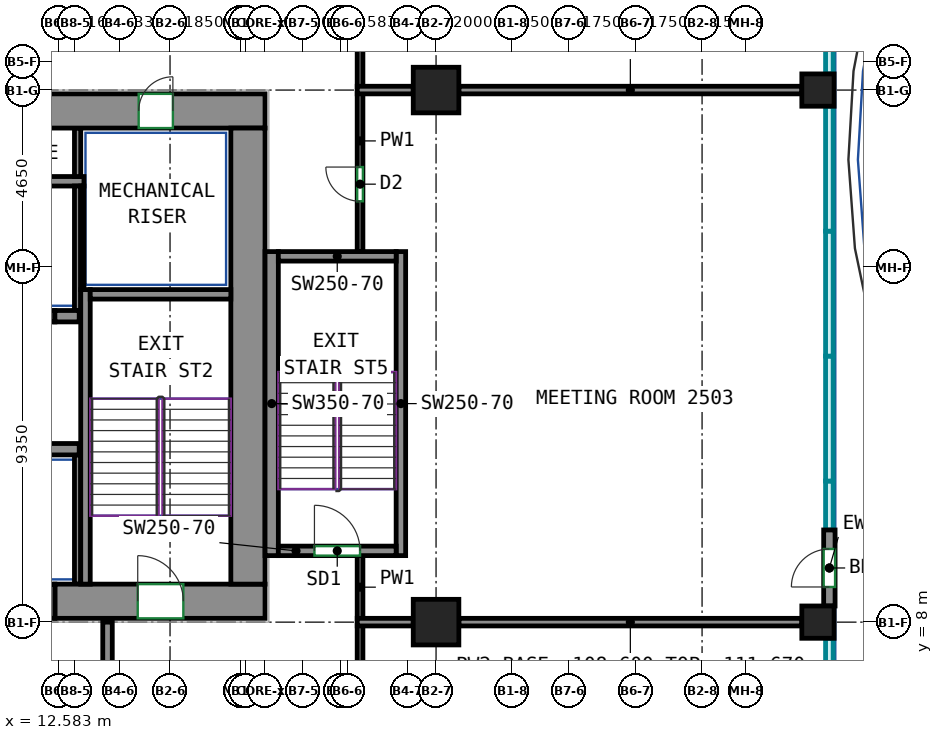
"""IFC4 building model, lengths in metres.
Left out: names, types, materials, properties, quantities, classifications, styles, units other than length and angle.
Written with IfcOpenShell. Run it as: python <this file> out.ifc"""

import sys

from ifc_helpers import new_model, si_unit, direction, frame, frame_2d, origin, origin_2d, place, context, subcontext, project, spatial, rectangle, extrude, source, transform, mapped, element, fill, save


model = new_model("IFC4")
c1 = context("Model", 3, precision=1e-05, world=origin(), true_north=direction((0.0, 1.0)))
c2 = subcontext(c1, "Body", "Model", "MODEL_VIEW")
j1 = project(units=[si_unit("LENGTHUNIT", "METRE"), si_unit("PLANEANGLEUNIT", "RADIAN")], contexts=[c1])
p1 = place(None, origin())
s1 = spatial("IfcSite", under=j1, at=p1, CompositionType="ELEMENT")
p2 = place(p1, origin())
s2 = spatial("IfcBuilding", under=s1, at=p2, CompositionType="ELEMENT")
p3 = place(p2, frame((0.0, 0.0, 108.6)))
s3 = spatial("IfcBuildingStorey", under=s2, at=p3, CompositionType="ELEMENT", Elevation=108.6)
m1 = source(origin(), c2, "Body", "SweptSolid", [
    extrude(rectangle(XDim=1.2, YDim=1.2, at=origin_2d()), origin(), (0.0, 0.0, 1.0), 3.72),
])
for number, where, z_axis, x_axis in (
    (1, (22.5, 8.0, 0.0), (0.0, 0.0, 1.0), (1.0, 0.0, 0.0)),
    (2, (22.5, 22.0, 0.0), (0.0, 0.0, 1.0), (1.0, 0.0, 0.0)),
):
    element("IfcColumn", number, at=place(p3, frame(where, z_axis=z_axis, x_axis=x_axis)), inside=s3, PredefinedType="COLUMN", context=c2, shape_type="MappedRepresentation", body=[
        mapped(m1, transform((0.0, 0.0, 0.0))),
    ])
m2 = source(origin(), c2, "Body", "SweptSolid", [
    extrude(rectangle(XDim=0.85, YDim=0.85, at=origin_2d()), origin(), (0.0, 0.0, 1.0), 3.72),
])
for number, where, z_axis, x_axis in (
    (3, (32.55, 8.0, 0.0), (0.0, 0.0, 1.0), (1.0, 0.0, 0.0)),
    (4, (32.55, 22.0, 0.0), (0.0, 0.0, 1.0), (1.0, 0.0, 0.0)),
):
    element("IfcColumn", number, at=place(p3, frame(where, z_axis=z_axis, x_axis=x_axis)), inside=s3, PredefinedType="COLUMN", context=c2, shape_type="MappedRepresentation", body=[
        mapped(m2, transform((0.0, 0.0, 0.0))),
    ])
m3 = source(origin(), c2, "Body", "SweptSolid", [
    extrude(rectangle(XDim=5.53, YDim=0.9, at=frame_2d((2.765, 0.0))), origin(), (0.0, 0.0, 1.0), 3.72),
])
p4 = place(p3, frame((12.47, 8.55, 0.0), z_axis=(0.0, 0.0, 1.0), x_axis=(1.0, 0.0, 0.0)))
e5 = element("IfcWall", 5, at=p4, inside=s3, PredefinedType="SHEAR", context=c2, shape_type="MappedRepresentation", body=[
    mapped(m3, transform((0.0, 0.0, 0.0))),
])
p5 = place(p4, frame((2.18, 0.0, 0.0)))
e6 = element("IfcOpeningElement", 6, at=p5, cuts=e5, PredefinedType="OPENING", context=c2, shape_type="SweptSolid", body=[
    extrude(rectangle(XDim=1.2, YDim=2.1, at=frame_2d((0.6, 1.05))), frame((0.0, 0.46, 0.0), z_axis=(0.0, -1.0, 0.0), x_axis=(1.0, 0.0, 0.0)), (0.0, 0.0, 1.0), 0.92),
])
m4 = source(origin(), c2, "Body", "SweptSolid", [
    extrude(rectangle(XDim=33.9, YDim=0.9, at=frame_2d((16.95, 0.0))), origin(), (0.0, 0.0, 1.0), 3.72),
])
p6 = place(p3, frame((-15.9, 21.45, 0.0), z_axis=(0.0, 0.0, 1.0), x_axis=(1.0, 0.0, 0.0)))
e7 = element("IfcWall", 7, at=p6, inside=s3, PredefinedType="SHEAR", context=c2, shape_type="MappedRepresentation", body=[
    mapped(m4, transform((0.0, 0.0, 0.0))),
])
p7 = place(p6, frame((7.12, 0.0, 0.0)))
e8 = element("IfcOpeningElement", 8, at=p7, cuts=e7, PredefinedType="OPENING", context=c2, shape_type="SweptSolid", body=[
    extrude(rectangle(XDim=0.9, YDim=2.1, at=frame_2d((0.45, 1.05))), frame((0.0, 0.46, 0.0), z_axis=(0.0, -1.0, 0.0), x_axis=(1.0, 0.0, 0.0)), (0.0, 0.0, 1.0), 0.92),
])
p8 = place(p6, frame((12.427, 0.0, 0.0)))
e9 = element("IfcOpeningElement", 9, at=p8, cuts=e7, PredefinedType="OPENING", context=c2, shape_type="SweptSolid", body=[
    extrude(rectangle(XDim=0.9, YDim=2.1, at=frame_2d((0.45, 1.05))), frame((0.0, 0.46, 0.0), z_axis=(0.0, -1.0, 0.0), x_axis=(1.0, 0.0, 0.0)), (0.0, 0.0, 1.0), 0.92),
])
p9 = place(p6, frame((17.465, 0.0, 0.0)))
e10 = element("IfcOpeningElement", 10, at=p9, cuts=e7, PredefinedType="OPENING", context=c2, shape_type="SweptSolid", body=[
    extrude(rectangle(XDim=0.9, YDim=2.1, at=frame_2d((0.45, 1.05))), frame((0.0, 0.46, 0.0), z_axis=(0.0, -1.0, 0.0), x_axis=(1.0, 0.0, 0.0)), (0.0, 0.0, 1.0), 0.92),
])
p10 = place(p6, frame((21.686, 0.0, 0.0)))
e11 = element("IfcOpeningElement", 11, at=p10, cuts=e7, PredefinedType="OPENING", context=c2, shape_type="SweptSolid", body=[
    extrude(rectangle(XDim=0.9, YDim=2.1, at=frame_2d((0.45, 1.05))), frame((0.0, 0.46, 0.0), z_axis=(0.0, -1.0, 0.0), x_axis=(1.0, 0.0, 0.0)), (0.0, 0.0, 1.0), 0.92),
])
p11 = place(p6, frame((26.027, 0.0, 0.0)))
e12 = element("IfcOpeningElement", 12, at=p11, cuts=e7, PredefinedType="OPENING", context=c2, shape_type="SweptSolid", body=[
    extrude(rectangle(XDim=0.9, YDim=2.1, at=frame_2d((0.45, 1.05))), frame((0.0, 0.46, 0.0), z_axis=(0.0, -1.0, 0.0), x_axis=(1.0, 0.0, 0.0)), (0.0, 0.0, 1.0), 0.92),
])
p12 = place(p6, frame((2.425, 0.0, 0.0)))
e13 = element("IfcOpeningElement", 13, at=p12, cuts=e7, PredefinedType="OPENING", context=c2, shape_type="SweptSolid", body=[
    extrude(rectangle(XDim=0.9, YDim=2.1, at=frame_2d((0.45, 1.05))), frame((0.0, 0.46, 0.0), z_axis=(0.0, -1.0, 0.0), x_axis=(1.0, 0.0, 0.0)), (0.0, 0.0, 1.0), 0.92),
])
p13 = place(p6, frame((30.575, 0.0, 0.0)))
e14 = element("IfcOpeningElement", 14, at=p13, cuts=e7, PredefinedType="OPENING", context=c2, shape_type="SweptSolid", body=[
    extrude(rectangle(XDim=0.9, YDim=2.1, at=frame_2d((0.45, 1.05))), frame((0.0, 0.46, 0.0), z_axis=(0.0, -1.0, 0.0), x_axis=(1.0, 0.0, 0.0)), (0.0, 0.0, 1.0), 0.92),
])
m5 = source(origin(), c2, "Body", "SweptSolid", [
    extrude(rectangle(XDim=12.0, YDim=0.9, at=frame_2d((6.0, 0.0))), origin(), (0.0, 0.0, 1.0), 3.72),
])
p14 = place(p3, frame((17.55, 9.0, 0.0), z_axis=(0.0, 0.0, 1.0), x_axis=(0.0, 1.0, 0.0)))
e15 = element("IfcWall", 15, at=p14, inside=s3, PredefinedType="SHEAR", context=c2, shape_type="MappedRepresentation", body=[
    mapped(m5, transform((0.0, 0.0, 0.0))),
])
m6 = source(origin(), c2, "Body", "SweptSolid", [
    extrude(rectangle(XDim=7.75, YDim=0.25, at=frame_2d((3.875, 0.0))), origin(), (0.0, 0.0, 1.0), 3.72),
])
p15 = place(p3, frame((13.275, 9.0, 0.0), z_axis=(0.0, 0.0, 1.0), x_axis=(0.0, 1.0, 0.0)))
e16 = element("IfcWall", 16, at=p15, inside=s3, PredefinedType="SHEAR", context=c2, shape_type="MappedRepresentation", body=[
    mapped(m6, transform((0.0, 0.0, 0.0))),
])
m7 = source(origin(), c2, "Body", "SweptSolid", [
    extrude(rectangle(XDim=3.7, YDim=0.25, at=frame_2d((1.85, 0.0))), origin(), (0.0, 0.0, 1.0), 3.72),
])
p16 = place(p3, frame((13.4, 16.625, 0.0), z_axis=(0.0, 0.0, 1.0), x_axis=(1.0, 0.0, 0.0)))
e17 = element("IfcWall", 17, at=p16, inside=s3, PredefinedType="SHEAR", context=c2, shape_type="MappedRepresentation", body=[
    mapped(m7, transform((0.0, 0.0, 0.0))),
])
m8 = source(origin(), c2, "Body", "SweptSolid", [
    extrude(rectangle(XDim=8.0, YDim=0.35, at=frame_2d((4.0, 0.0))), origin(), (0.0, 0.0, 1.0), 3.72),
])
p17 = place(p3, frame((18.175, 9.75, 0.0), z_axis=(0.0, 0.0, 1.0), x_axis=(0.0, 1.0, 0.0)))
e18 = element("IfcWall", 18, at=p17, inside=s3, PredefinedType="SHEAR", context=c2, shape_type="MappedRepresentation", body=[
    mapped(m8, transform((0.0, 0.0, 0.0))),
])
m9 = source(origin(), c2, "Body", "SweptSolid", [
    extrude(rectangle(XDim=8.0, YDim=0.25, at=frame_2d((4.0, 0.0))), origin(), (0.0, 0.0, 1.0), 3.72),
])
p18 = place(p3, frame((21.575, 9.75, 0.0), z_axis=(0.0, 0.0, 1.0), x_axis=(0.0, 1.0, 0.0)))
e19 = element("IfcWall", 19, at=p18, inside=s3, PredefinedType="SHEAR", context=c2, shape_type="MappedRepresentation", body=[
    mapped(m9, transform((0.0, 0.0, 0.0))),
])
m10 = source(origin(), c2, "Body", "SweptSolid", [
    extrude(rectangle(XDim=3.1, YDim=0.25, at=frame_2d((1.55, 0.0))), origin(), (0.0, 0.0, 1.0), 3.72),
])
p19 = place(p3, frame((18.35, 9.875, 0.0), z_axis=(0.0, 0.0, 1.0), x_axis=(1.0, 0.0, 0.0)))
e20 = element("IfcWall", 20, at=p19, inside=s3, PredefinedType="SHEAR", context=c2, shape_type="MappedRepresentation", body=[
    mapped(m10, transform((0.0, 0.0, 0.0))),
])
p20 = place(p19, frame((0.95, 0.0, 0.0)))
e21 = element("IfcOpeningElement", 21, at=p20, cuts=e20, PredefinedType="OPENING", context=c2, shape_type="SweptSolid", body=[
    extrude(rectangle(XDim=1.2, YDim=2.1, at=frame_2d((0.6, 1.05))), frame((0.0, 0.135, 0.0), z_axis=(0.0, -1.0, 0.0), x_axis=(1.0, 0.0, 0.0)), (0.0, 0.0, 1.0), 0.27),
])
p21 = place(p3, frame((18.35, 17.625, 0.0), z_axis=(0.0, 0.0, 1.0), x_axis=(1.0, 0.0, 0.0)))
e22 = element("IfcWall", 22, at=p21, inside=s3, PredefinedType="SHEAR", context=c2, shape_type="MappedRepresentation", body=[
    mapped(m10, transform((0.0, 0.0, 0.0))),
])
m11 = source(origin(), c2, "Body", "SweptSolid", [
    extrude(rectangle(XDim=2.82, YDim=0.3, at=frame_2d((1.41, 0.0))), origin(), (0.0, 0.0, 1.0), 3.72),
])
p22 = place(p3, frame((10.29, 12.55, 0.0), z_axis=(0.0, 0.0, 1.0), x_axis=(1.0, 0.0, 0.0)))
e23 = element("IfcWall", 23, at=p22, inside=s3, PredefinedType="SHEAR", context=c2, shape_type="MappedRepresentation", body=[
    mapped(m11, transform((0.0, 0.0, 0.0))),
])
m12 = source(origin(), c2, "Body", "SweptSolid", [
    extrude(rectangle(XDim=0.64, YDim=0.3, at=frame_2d((0.32, 0.0))), origin(), (0.0, 0.0, 1.0), 3.72),
])
p23 = place(p3, frame((12.47, 16.05, 0.0), z_axis=(0.0, 0.0, 1.0), x_axis=(1.0, 0.0, 0.0)))
e24 = element("IfcWall", 24, at=p23, inside=s3, PredefinedType="SHEAR", context=c2, shape_type="MappedRepresentation", body=[
    mapped(m12, transform((0.0, 0.0, 0.0))),
])
m13 = source(origin(), c2, "Body", "SweptSolid", [
    extrude(rectangle(XDim=2.0, YDim=0.3, at=frame_2d((1.0, 0.0))), origin(), (0.0, 0.0, 1.0), 3.72),
])
p24 = place(p3, frame((32.85, 8.425, 0.0), z_axis=(0.0, 0.0, 1.0), x_axis=(0.0, 1.0, 0.0)))
e25 = element("IfcWall", 25, at=p24, inside=s3, PredefinedType="SOLIDWALL", context=c2, shape_type="MappedRepresentation", body=[
    mapped(m13, transform((0.0, 0.0, 0.0))),
])
p25 = place(p24, frame((0.5, 0.0, 0.0)))
e26 = element("IfcOpeningElement", 26, at=p25, cuts=e25, PredefinedType="OPENING", context=c2, shape_type="SweptSolid", body=[
    extrude(rectangle(XDim=1.0, YDim=2.1, at=frame_2d((0.5, 1.05))), frame((0.0, 0.16, 0.0), z_axis=(0.0, -1.0, 0.0), x_axis=(1.0, 0.0, 0.0)), (0.0, 0.0, 1.0), 0.32),
])
m14 = source(origin(), c2, "Body", "SweptSolid", [
    extrude(rectangle(XDim=1.4, YDim=0.3, at=frame_2d((0.7, 0.0))), origin(), (0.0, 0.0, 1.0), 3.72),
])
p26 = place(p3, frame((11.07, 16.05, 0.0), z_axis=(0.0, 0.0, 1.0), x_axis=(1.0, 0.0, 0.0)))
e27 = element("IfcWall", 27, at=p26, inside=s3, PredefinedType="PARTITIONING", context=c2, shape_type="MappedRepresentation", body=[
    mapped(m14, transform((0.0, 0.0, 0.0))),
])
p27 = place(p26, frame((0.15, 0.0, 0.0)))
e28 = element("IfcOpeningElement", 28, at=p27, cuts=e27, PredefinedType="OPENING", context=c2, shape_type="SweptSolid", body=[
    extrude(rectangle(XDim=1.1, YDim=2.1, at=frame_2d((0.55, 1.05))), frame((0.0, 0.16, 0.0), z_axis=(0.0, -1.0, 0.0), x_axis=(1.0, 0.0, 0.0)), (0.0, 0.0, 1.0), 0.32),
])
m15 = source(origin(), c2, "Body", "SweptSolid", [
    extrude(rectangle(XDim=2.65, YDim=0.25, at=frame_2d((1.325, 0.0))), origin(), (0.0, 0.0, 1.0), 3.72),
])
p28 = place(p3, frame((13.855, 5.35, 0.0), z_axis=(0.0, 0.0, 1.0), x_axis=(0.0, 1.0, 0.0)))
e29 = element("IfcWall", 29, at=p28, inside=s3, PredefinedType="PARTITIONING", context=c2, shape_type="MappedRepresentation", body=[
    mapped(m15, transform((0.0, 0.0, 0.0))),
])
m16 = source(origin(), c2, "Body", "SweptSolid", [
    extrude(rectangle(XDim=19.01, YDim=0.25, at=frame_2d((9.505, 0.0))), origin(), (0.0, 0.0, 1.0), 3.72),
])
p29 = place(p3, frame((-5.775, 19.6, 0.0), z_axis=(0.0, 0.0, 1.0), x_axis=(1.0, 0.0, 0.0)))
e30 = element("IfcWall", 30, at=p29, inside=s3, PredefinedType="PARTITIONING", context=c2, shape_type="MappedRepresentation", body=[
    mapped(m16, transform((0.0, 0.0, 0.0))),
])
m17 = source(origin(), c2, "Body", "SweptSolid", [
    extrude(rectangle(XDim=3.275, YDim=0.165, at=frame_2d((1.638, 0.0))), origin(), (0.0, 0.0, 1.0), 3.72),
])
p30 = place(p3, frame((13.067, 16.2, 0.0), z_axis=(0.0, 0.0, 1.0), x_axis=(0.0, 1.0, 0.0)))
e31 = element("IfcWall", 31, at=p30, inside=s3, PredefinedType="PARTITIONING", context=c2, shape_type="MappedRepresentation", body=[
    mapped(m17, transform((0.0, 0.0, 0.0))),
])
m18 = source(origin(), c2, "Body", "SweptSolid", [
    extrude(rectangle(XDim=1.275, YDim=0.165, at=frame_2d((0.637, 0.0))), origin(), (0.0, 0.0, 1.0), 3.72),
])
p31 = place(p3, frame((13.067, 19.725, 0.0), z_axis=(0.0, 0.0, 1.0), x_axis=(0.0, 1.0, 0.0)))
e32 = element("IfcWall", 32, at=p31, inside=s3, PredefinedType="PARTITIONING", context=c2, shape_type="MappedRepresentation", body=[
    mapped(m18, transform((0.0, 0.0, 0.0))),
])
m19 = source(origin(), c2, "Body", "SweptSolid", [
    extrude(rectangle(XDim=2.725, YDim=0.085, at=frame_2d((1.363, 0.0))), origin(), (0.0, 0.0, 1.0), 3.72),
])
p32 = place(p3, frame((13.192, 16.75, 0.0), z_axis=(0.0, 0.0, 1.0), x_axis=(0.0, 1.0, 0.0)))
e33 = element("IfcWall", 33, at=p32, inside=s3, PredefinedType="PARTITIONING", context=c2, shape_type="MappedRepresentation", body=[
    mapped(m19, transform((0.0, 0.0, 0.0))),
])
m20 = source(origin(), c2, "Body", "SweptSolid", [
    extrude(rectangle(XDim=3.4, YDim=0.165, at=frame_2d((1.7, 0.0))), origin(), (0.0, 0.0, 1.0), 3.72),
])
p33 = place(p3, frame((13.067, 9.0, 0.0), z_axis=(0.0, 0.0, 1.0), x_axis=(0.0, 1.0, 0.0)))
e34 = element("IfcWall", 34, at=p33, inside=s3, PredefinedType="PARTITIONING", context=c2, shape_type="MappedRepresentation", body=[
    mapped(m20, transform((0.0, 0.0, 0.0))),
])
m21 = source(origin(), c2, "Body", "SweptSolid", [
    extrude(rectangle(XDim=1.4, YDim=0.9, at=frame_2d((0.7, 0.0))), origin(), (0.0, 0.0, 1.0), 2.7),
])
p34 = place(p3, frame((11.07, 8.55, 0.0), z_axis=(0.0, 0.0, 1.0), x_axis=(1.0, 0.0, 0.0)))
e35 = element("IfcWall", 35, at=p34, inside=s3, PredefinedType="PARTITIONING", context=c2, shape_type="MappedRepresentation", body=[
    mapped(m21, transform((0.0, 0.0, 0.0))),
])
p35 = place(p34, frame((0.25, 0.0, 0.0)))
e36 = element("IfcOpeningElement", 36, at=p35, cuts=e35, PredefinedType="OPENING", context=c2, shape_type="SweptSolid", body=[
    extrude(rectangle(XDim=0.9, YDim=2.1, at=frame_2d((0.45, 1.05))), frame((0.0, 0.46, 0.0), z_axis=(0.0, -1.0, 0.0), x_axis=(1.0, 0.0, 0.0)), (0.0, 0.0, 1.0), 0.92),
])
p36 = place(p3, frame((20.5, 4.35, 0.0), z_axis=(0.0, 0.0, 1.0), x_axis=(0.0, 1.0, 0.0)))
e37 = element("IfcWall", 37, at=p36, inside=s3, PredefinedType="PARTITIONING", context=c2, shape_type="SweptSolid", body=[
    extrude(rectangle(XDim=3.56, YDim=0.15, at=frame_2d((1.78, 0.0))), origin(), (0.0, 0.0, 1.0), 3.72),
])
p37 = place(p3, frame((20.5, 17.75, 0.0), z_axis=(0.0, 0.0, 1.0), x_axis=(0.0, 1.0, 0.0)))
e38 = element("IfcWall", 38, at=p37, inside=s3, PredefinedType="PARTITIONING", context=c2, shape_type="SweptSolid", body=[
    extrude(rectangle(XDim=4.16, YDim=0.15, at=frame_2d((2.08, 0.0))), origin(), (0.0, 0.0, 1.0), 3.72),
])
p38 = place(p37, frame((1.324, 0.0, 0.0)))
e39 = element("IfcOpeningElement", 39, at=p38, cuts=e38, PredefinedType="OPENING", context=c2, shape_type="SweptSolid", body=[
    extrude(rectangle(XDim=0.9, YDim=2.1, at=frame_2d((0.45, 1.05))), frame((0.0, 0.085, 0.0), z_axis=(0.0, -1.0, 0.0), x_axis=(1.0, 0.0, 0.0)), (0.0, 0.0, 1.0), 0.17),
])
p39 = place(p3, frame((20.5, 8.09, 0.0), z_axis=(0.0, 0.0, 1.0), x_axis=(0.0, 1.0, 0.0)))
e40 = element("IfcWall", 40, at=p39, inside=s3, PredefinedType="PARTITIONING", context=c2, shape_type="SweptSolid", body=[
    extrude(rectangle(XDim=1.66, YDim=0.15, at=frame_2d((0.83, 0.0))), origin(), (0.0, 0.0, 1.0), 3.72),
])
p40 = place(p3, frame((20.5, 22.09, 0.0), z_axis=(0.0, 0.0, 1.0), x_axis=(0.0, 1.0, 0.0)))
e41 = element("IfcWall", 41, at=p40, inside=s3, PredefinedType="PARTITIONING", context=c2, shape_type="SweptSolid", body=[
    extrude(rectangle(XDim=2.235, YDim=0.15, at=frame_2d((1.117, 0.0))), origin(), (0.0, 0.0, 1.0), 3.72),
])
p41 = place(p3, frame((20.426, 8.0, 0.0), z_axis=(0.0, 0.0, 1.0), x_axis=(1.0, 0.0, 0.0)))
e42 = element("IfcWall", 42, at=p41, inside=s3, PredefinedType="PARTITIONING", context=c2, shape_type="SweptSolid", body=[
    extrude(rectangle(XDim=1.474, YDim=0.2, at=frame_2d((0.737, 0.0))), origin(), (0.0, 0.0, 1.0), 3.72),
])
for number, where, z_axis, x_axis in (
    (43, (23.1, 8.0, 0.0), (0.0, 0.0, 1.0), (1.0, 0.0, 0.0)),
    (44, (23.1, 22.0, 0.0), (0.0, 0.0, 1.0), (1.0, 0.0, 0.0)),
):
    element("IfcWall", number, at=place(p3, frame(where, z_axis=z_axis, x_axis=x_axis)), inside=s3, PredefinedType="PARTITIONING", context=c2, shape_type="SweptSolid", body=[
        extrude(rectangle(XDim=9.025, YDim=0.2, at=frame_2d((4.512, 0.0))), origin(), (0.0, 0.0, 1.0), 3.07),
    ])
p42 = place(p3, frame((20.426, 22.0, 0.0), z_axis=(0.0, 0.0, 1.0), x_axis=(1.0, 0.0, 0.0)))
e45 = element("IfcWall", 45, at=p42, inside=s3, PredefinedType="PARTITIONING", context=c2, shape_type="SweptSolid", body=[
    extrude(rectangle(XDim=1.474, YDim=0.2, at=frame_2d((0.737, 0.0))), origin(), (0.0, 0.0, 1.0), 3.72),
])
p43 = place(p25, origin())
e46 = element("IfcDoor", 46, at=p43, inside=s3, OperationType="SINGLE_SWING_LEFT", PredefinedType="DOOR", context=c2, shape_type="SweptSolid", body=[
    extrude(rectangle(XDim=1.0, YDim=2.1, at=frame_2d((0.5, 1.05))), frame((0.0, 0.025, 0.0), z_axis=(0.0, -1.0, 0.0), x_axis=(1.0, 0.0, 0.0)), (0.0, 0.0, 1.0), 0.05),
])
fill(e26, e46)
p44 = place(p13, origin())
e47 = element("IfcDoor", 47, at=p44, inside=s3, OperationType="SINGLE_SWING_RIGHT", PredefinedType="DOOR", context=c2, shape_type="SweptSolid", body=[
    extrude(rectangle(XDim=0.9, YDim=2.1, at=frame_2d((0.45, 1.05))), frame((0.0, -0.305, 0.0), z_axis=(0.0, -1.0, 0.0), x_axis=(1.0, 0.0, 0.0)), (0.0, 0.0, 1.0), 0.05),
])
fill(e14, e47)
p45 = place(p5, origin())
e48 = element("IfcDoor", 48, at=p45, inside=s3, OperationType="DOUBLE_DOOR_SINGLE_SWING", PredefinedType="DOOR", context=c2, shape_type="SweptSolid", body=[
    extrude(rectangle(XDim=1.2, YDim=2.1, at=frame_2d((0.6, 1.05))), frame((0.0, 0.355, 0.0), z_axis=(0.0, -1.0, 0.0), x_axis=(1.0, 0.0, 0.0)), (0.0, 0.0, 1.0), 0.05),
])
fill(e6, e48)
p46 = place(p20, origin())
e49 = element("IfcDoor", 49, at=p46, inside=s3, OperationType="DOUBLE_DOOR_SINGLE_SWING", PredefinedType="DOOR", context=c2, shape_type="SweptSolid", body=[
    extrude(rectangle(XDim=1.2, YDim=2.1, at=frame_2d((0.6, 1.05))), frame((0.0, 0.025, 0.0), z_axis=(0.0, -1.0, 0.0), x_axis=(1.0, 0.0, 0.0)), (0.0, 0.0, 1.0), 0.05),
])
fill(e21, e49)
p47 = place(p38, origin())
e50 = element("IfcDoor", 50, at=p47, inside=s3, OperationType="SINGLE_SWING_RIGHT", PredefinedType="DOOR", context=c2, shape_type="SweptSolid", body=[
    extrude(rectangle(XDim=0.9, YDim=2.1, at=frame_2d((0.45, 1.05))), frame((0.0, 0.025, 0.0), z_axis=(0.0, -1.0, 0.0), x_axis=(1.0, 0.0, 0.0)), (0.0, 0.0, 1.0), 0.05),
])
fill(e39, e50)
save(model, sys.argv[1])
